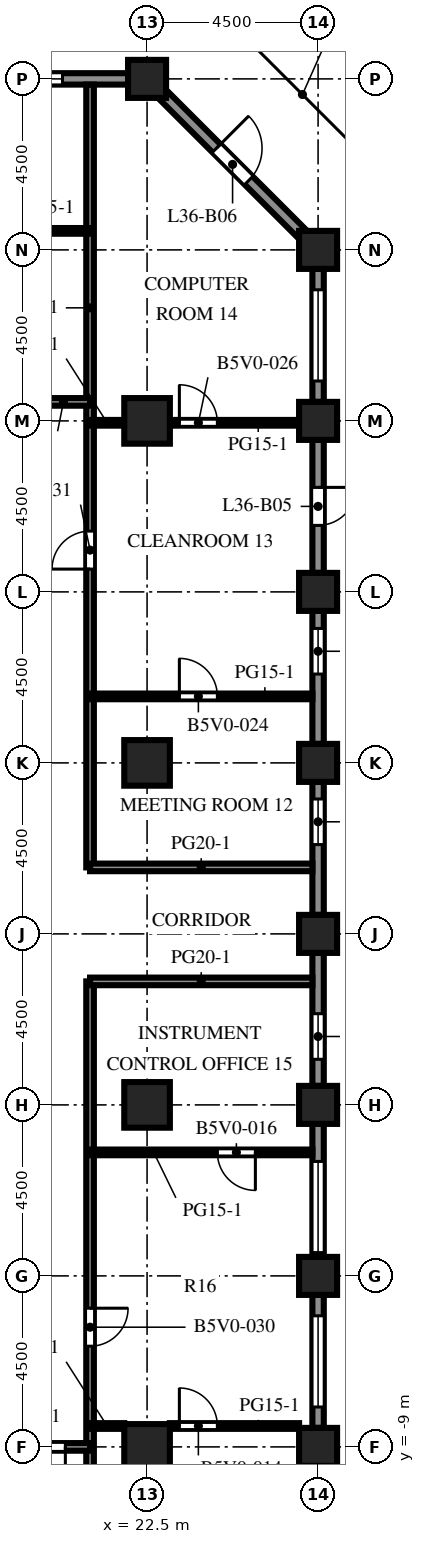
"""IFC4 building model, lengths in metres.
Left out: names, types, materials, properties, quantities, classifications, styles, units other than length and angle.
Written with IfcOpenShell. Run it as: python <this file> out.ifc"""

import sys

from ifc_helpers import new_model, si_unit, direction, frame, frame_2d, origin, origin_2d, place, context, subcontext, project, spatial, rectangle, extrude, element, fill, save


model = new_model("IFC4")
c1 = context("Model", 3, precision=1e-05, world=origin(), true_north=direction((0.0, 1.0)))
c2 = subcontext(c1, "Body", "Model", "MODEL_VIEW")
j1 = project(units=[si_unit("LENGTHUNIT", "METRE"), si_unit("PLANEANGLEUNIT", "RADIAN")], contexts=[c1])
p1 = place(None, origin())
s1 = spatial("IfcSite", under=j1, at=p1, CompositionType="ELEMENT")
p2 = place(p1, origin())
s2 = spatial("IfcBuilding", under=s1, at=p2, CompositionType="ELEMENT")
p3 = place(p2, frame((0.0, 0.0, 160.9)))
s3 = spatial("IfcBuildingStorey", under=s2, at=p3, CompositionType="ELEMENT", Elevation=160.9)
for number, where, z_axis, x_axis in (
    (1, (22.5, 27.0, 0.0), (0.0, 0.0, 1.0), (1.0, 0.0, 0.0)),
    (2, (27.0, -9.0, 0.0), (0.0, 0.0, 1.0), (1.0, 0.0, 0.0)),
    (3, (27.0, -4.5, 0.0), (0.0, 0.0, 1.0), (1.0, 0.0, 0.0)),
    (4, (27.0, 0.0, 0.0), (0.0, 0.0, 1.0), (1.0, 0.0, 0.0)),
    (5, (27.0, 4.5, 0.0), (0.0, 0.0, 1.0), (1.0, 0.0, 0.0)),
    (6, (27.0, 9.0, 0.0), (0.0, 0.0, 1.0), (1.0, 0.0, 0.0)),
    (7, (27.0, 13.5, 0.0), (0.0, 0.0, 1.0), (1.0, 0.0, 0.0)),
    (8, (27.0, 18.0, 0.0), (0.0, 0.0, 1.0), (1.0, 0.0, 0.0)),
    (9, (27.0, 22.5, 0.0), (0.0, 0.0, 1.0), (1.0, 0.0, 0.0)),
):
    element("IfcColumn", number, at=place(p3, frame(where, z_axis=z_axis, x_axis=x_axis)), inside=s3, PredefinedType="COLUMN", context=c2, shape_type="SweptSolid", body=[
        extrude(rectangle(XDim=1.0, YDim=1.0, at=origin_2d()), origin(), (0.0, 0.0, 1.0), 4.1),
    ])
for number, where, z_axis, x_axis in (
    (10, (22.5, -9.0, 0.0), (0.0, 0.0, 1.0), (1.0, 0.0, 0.0)),
    (11, (22.5, 0.0, 0.0), (0.0, 0.0, 1.0), (1.0, 0.0, 0.0)),
    (12, (22.5, 9.0, 0.0), (0.0, 0.0, 1.0), (1.0, 0.0, 0.0)),
    (13, (22.5, 18.0, 0.0), (0.0, 0.0, 1.0), (1.0, 0.0, 0.0)),
):
    element("IfcColumn", number, at=place(p3, frame(where, z_axis=z_axis, x_axis=x_axis)), inside=s3, PredefinedType="COLUMN", context=c2, shape_type="SweptSolid", body=[
        extrude(rectangle(XDim=1.2, YDim=1.2, at=origin_2d()), origin(), (0.0, 0.0, 1.0), 4.1),
    ])
p4 = place(p3, frame((27.0, -5.0, 0.0), z_axis=(0.0, 0.0, 1.0), x_axis=(0.0, -1.0, 0.0)))
e14 = element("IfcWall", 14, at=p4, inside=s3, PredefinedType="SOLIDWALL", context=c2, shape_type="SweptSolid", body=[
    extrude(rectangle(XDim=3.5, YDim=0.3, at=frame_2d((1.75, 0.0))), origin(), (0.0, 0.0, 1.0), 2.85),
])
p5 = place(p4, frame((0.55, 0.0, 0.8)))
e15 = element("IfcOpeningElement", 15, at=p5, cuts=e14, PredefinedType="OPENING", context=c2, shape_type="SweptSolid", body=[
    extrude(rectangle(XDim=2.4, YDim=1.7, at=frame_2d((1.2, 0.85))), frame((0.0, 0.16, 0.0), z_axis=(0.0, -1.0, 0.0), x_axis=(1.0, 0.0, 0.0)), (0.0, 0.0, 1.0), 0.32),
])
p6 = place(p3, frame((27.0, -0.5, 0.0), z_axis=(0.0, 0.0, 1.0), x_axis=(0.0, -1.0, 0.0)))
e16 = element("IfcWall", 16, at=p6, inside=s3, PredefinedType="SOLIDWALL", context=c2, shape_type="SweptSolid", body=[
    extrude(rectangle(XDim=3.5, YDim=0.3, at=frame_2d((1.75, 0.0))), origin(), (0.0, 0.0, 1.0), 2.85),
])
p7 = place(p6, frame((0.988, 0.0, 0.8)))
e17 = element("IfcOpeningElement", 17, at=p7, cuts=e16, PredefinedType="OPENING", context=c2, shape_type="SweptSolid", body=[
    extrude(rectangle(XDim=2.4, YDim=1.7, at=frame_2d((1.2, 0.85))), frame((0.0, 0.16, 0.0), z_axis=(0.0, -1.0, 0.0), x_axis=(1.0, 0.0, 0.0)), (0.0, 0.0, 1.0), 0.32),
])
p8 = place(p3, frame((27.0, 4.0, 0.0), z_axis=(0.0, 0.0, 1.0), x_axis=(0.0, -1.0, 0.0)))
e18 = element("IfcWall", 18, at=p8, inside=s3, PredefinedType="SOLIDWALL", context=c2, shape_type="SweptSolid", body=[
    extrude(rectangle(XDim=3.5, YDim=0.3, at=frame_2d((1.75, 0.0))), origin(), (0.0, 0.0, 1.0), 2.85),
])
p9 = place(p8, frame((1.6, 0.0, 0.8)))
e19 = element("IfcOpeningElement", 19, at=p9, cuts=e18, PredefinedType="OPENING", context=c2, shape_type="SweptSolid", body=[
    extrude(rectangle(XDim=1.2, YDim=1.7, at=frame_2d((0.6, 0.85))), frame((0.0, 0.16, 0.0), z_axis=(0.0, -1.0, 0.0), x_axis=(1.0, 0.0, 0.0)), (0.0, 0.0, 1.0), 0.32),
])
p10 = place(p3, frame((27.0, 8.5, 0.0), z_axis=(0.0, 0.0, 1.0), x_axis=(0.0, -1.0, 0.0)))
e20 = element("IfcWall", 20, at=p10, inside=s3, PredefinedType="SOLIDWALL", context=c2, shape_type="SweptSolid", body=[
    extrude(rectangle(XDim=3.5, YDim=0.3, at=frame_2d((1.75, 0.0))), origin(), (0.0, 0.0, 1.0), 2.85),
])
p11 = place(p10, frame((0.45, 0.0, 0.8)))
e21 = element("IfcOpeningElement", 21, at=p11, cuts=e20, PredefinedType="OPENING", context=c2, shape_type="SweptSolid", body=[
    extrude(rectangle(XDim=1.2, YDim=1.7, at=frame_2d((0.6, 0.85))), frame((0.0, 0.16, 0.0), z_axis=(0.0, -1.0, 0.0), x_axis=(1.0, 0.0, 0.0)), (0.0, 0.0, 1.0), 0.32),
])
p12 = place(p3, frame((27.0, 13.0, 0.0), z_axis=(0.0, 0.0, 1.0), x_axis=(0.0, -1.0, 0.0)))
e22 = element("IfcWall", 22, at=p12, inside=s3, PredefinedType="SOLIDWALL", context=c2, shape_type="SweptSolid", body=[
    extrude(rectangle(XDim=3.5, YDim=0.3, at=frame_2d((1.75, 0.0))), origin(), (0.0, 0.0, 1.0), 2.85),
])
p13 = place(p12, frame((0.462, 0.0, 0.8)))
e23 = element("IfcOpeningElement", 23, at=p13, cuts=e22, PredefinedType="OPENING", context=c2, shape_type="SweptSolid", body=[
    extrude(rectangle(XDim=1.2, YDim=1.7, at=frame_2d((0.6, 0.85))), frame((0.0, 0.16, 0.0), z_axis=(0.0, -1.0, 0.0), x_axis=(1.0, 0.0, 0.0)), (0.0, 0.0, 1.0), 0.32),
])
p14 = place(p3, frame((27.0, 17.5, 0.0), z_axis=(0.0, 0.0, 1.0), x_axis=(0.0, -1.0, 0.0)))
e24 = element("IfcWall", 24, at=p14, inside=s3, PredefinedType="SOLIDWALL", context=c2, shape_type="SweptSolid", body=[
    extrude(rectangle(XDim=3.5, YDim=0.3, at=frame_2d((1.75, 0.0))), origin(), (0.0, 0.0, 1.0), 2.85),
])
p15 = place(p14, frame((1.25, 0.0, 0.0)))
e25 = element("IfcOpeningElement", 25, at=p15, cuts=e24, PredefinedType="OPENING", context=c2, shape_type="SweptSolid", body=[
    extrude(rectangle(XDim=1.0, YDim=2.2, at=frame_2d((0.5, 1.1))), frame((0.0, 0.16, 0.0), z_axis=(0.0, -1.0, 0.0), x_axis=(1.0, 0.0, 0.0)), (0.0, 0.0, 1.0), 0.32),
])
p16 = place(p3, frame((27.0, 22.0, 0.0), z_axis=(0.0, 0.0, 1.0), x_axis=(0.0, -1.0, 0.0)))
e26 = element("IfcWall", 26, at=p16, inside=s3, PredefinedType="SOLIDWALL", context=c2, shape_type="SweptSolid", body=[
    extrude(rectangle(XDim=3.5, YDim=0.3, at=frame_2d((1.75, 0.0))), origin(), (0.0, 0.0, 1.0), 2.85),
])
p17 = place(p16, frame((0.55, 0.0, 0.8)))
e27 = element("IfcOpeningElement", 27, at=p17, cuts=e26, PredefinedType="OPENING", context=c2, shape_type="SweptSolid", body=[
    extrude(rectangle(XDim=2.4, YDim=1.7, at=frame_2d((1.2, 0.85))), frame((0.0, 0.16, 0.0), z_axis=(0.0, -1.0, 0.0), x_axis=(1.0, 0.0, 0.0)), (0.0, 0.0, 1.0), 0.32),
])
p18 = place(p3, frame((22.894, 26.606, 0.0), z_axis=(0.0, 0.0, 1.0), x_axis=(0.707106781187, -0.707106781187, 0.0)))
e28 = element("IfcWall", 28, at=p18, inside=s3, PredefinedType="SOLIDWALL", context=c2, shape_type="SweptSolid", body=[
    extrude(rectangle(XDim=5.25, YDim=0.3, at=frame_2d((2.625, 0.0))), origin(), (0.0, 0.0, 1.0), 2.85),
])
p19 = place(p18, frame((2.025, 0.0, 0.0)))
e29 = element("IfcOpeningElement", 29, at=p19, cuts=e28, PredefinedType="OPENING", context=c2, shape_type="SweptSolid", body=[
    extrude(rectangle(XDim=1.2, YDim=2.2, at=frame_2d((0.6, 1.1))), frame((0.0, 0.16, 0.0), z_axis=(0.0, -1.0, 0.0), x_axis=(1.0, 0.0, 0.0)), (0.0, 0.0, 1.0), 0.32),
])
p20 = place(p3, frame((18.5, 27.0, 0.0), z_axis=(0.0, 0.0, 1.0), x_axis=(1.0, 0.0, 0.0)))
e30 = element("IfcWall", 30, at=p20, inside=s3, PredefinedType="SOLIDWALL", context=c2, shape_type="SweptSolid", body=[
    extrude(rectangle(XDim=3.5, YDim=0.3, at=frame_2d((1.75, 0.0))), origin(), (0.0, 0.0, 1.0), 2.85),
])
p21 = place(p20, frame((0.575, 0.0, 0.8)))
e31 = element("IfcOpeningElement", 31, at=p21, cuts=e30, PredefinedType="OPENING", context=c2, shape_type="SweptSolid", body=[
    extrude(rectangle(XDim=1.2, YDim=1.7, at=frame_2d((0.6, 0.85))), frame((0.0, 0.16, 0.0), z_axis=(0.0, -1.0, 0.0), x_axis=(1.0, 0.0, 0.0)), (0.0, 0.0, 1.0), 0.32),
])
p22 = place(p3, frame((21.0, 3.25, 0.0), z_axis=(0.0, 0.0, 1.0), x_axis=(0.0, -1.0, 0.0)))
e32 = element("IfcWall", 32, at=p22, inside=s3, PredefinedType="PARTITIONING", context=c2, shape_type="SweptSolid", body=[
    extrude(rectangle(XDim=30.1, YDim=0.2, at=frame_2d((15.05, 0.0))), origin(), (0.0, 0.0, 1.0), 3.65),
])
p23 = place(p22, frame((8.6, 0.0, 0.0)))
e33 = element("IfcOpeningElement", 33, at=p23, cuts=e32, PredefinedType="OPENING", context=c2, shape_type="SweptSolid", body=[
    extrude(rectangle(XDim=1.0, YDim=2.1, at=frame_2d((0.5, 1.05))), frame((0.0, 0.11, 0.0), z_axis=(0.0, -1.0, 0.0), x_axis=(1.0, 0.0, 0.0)), (0.0, 0.0, 1.0), 0.22),
])
p24 = place(p3, frame((21.0, 26.85, 0.0), z_axis=(0.0, 0.0, 1.0), x_axis=(0.0, -1.0, 0.0)))
e34 = element("IfcWall", 34, at=p24, inside=s3, PredefinedType="PARTITIONING", context=c2, shape_type="SweptSolid", body=[
    extrude(rectangle(XDim=20.6, YDim=0.2, at=frame_2d((10.3, 0.0))), origin(), (0.0, 0.0, 1.0), 3.65),
])
p25 = place(p24, frame((11.75, 0.0, 0.0)))
e35 = element("IfcOpeningElement", 35, at=p25, cuts=e34, PredefinedType="OPENING", context=c2, shape_type="SweptSolid", body=[
    extrude(rectangle(XDim=1.0, YDim=2.1, at=frame_2d((0.5, 1.05))), frame((0.0, 0.11, 0.0), z_axis=(0.0, -1.0, 0.0), x_axis=(1.0, 0.0, 0.0)), (0.0, 0.0, 1.0), 0.22),
])
p26 = place(p3, frame((21.0, -9.0, 0.0), z_axis=(0.0, 0.0, 1.0), x_axis=(-1.0, 0.0, 0.0)))
e36 = element("IfcWall", 36, at=p26, inside=s3, PredefinedType="PARTITIONING", context=c2, shape_type="SweptSolid", body=[
    extrude(rectangle(XDim=3.0, YDim=0.2, at=frame_2d((1.5, 0.0))), origin(), (0.0, 0.0, 1.0), 3.65),
])
p27 = place(p26, frame((0.65, 0.0, 0.0)))
e37 = element("IfcOpeningElement", 37, at=p27, cuts=e36, PredefinedType="OPENING", context=c2, shape_type="SweptSolid", body=[
    extrude(rectangle(XDim=1.0, YDim=2.1, at=frame_2d((0.5, 1.05))), frame((0.0, 0.11, 0.0), z_axis=(0.0, -1.0, 0.0), x_axis=(1.0, 0.0, 0.0)), (0.0, 0.0, 1.0), 0.22),
])
p28 = place(p3, frame((21.0, -8.45, 0.0), z_axis=(0.0, 0.0, 1.0), x_axis=(1.0, 0.0, 0.0)))
e38 = element("IfcWall", 38, at=p28, inside=s3, PredefinedType="PARTITIONING", context=c2, shape_type="SweptSolid", body=[
    extrude(rectangle(XDim=0.9, YDim=0.15, at=frame_2d((0.45, 0.0))), origin(), (0.0, 0.0, 1.0), 3.65),
])
p29 = place(p3, frame((26.5, -8.45, 0.0), z_axis=(0.0, 0.0, 1.0), x_axis=(-1.0, 0.0, 0.0)))
e39 = element("IfcWall", 39, at=p29, inside=s3, PredefinedType="PARTITIONING", context=c2, shape_type="SweptSolid", body=[
    extrude(rectangle(XDim=3.4, YDim=0.15, at=frame_2d((1.7, 0.0))), origin(), (0.0, 0.0, 1.0), 3.65),
])
p30 = place(p29, frame((2.15, 0.0, 0.0)))
e40 = element("IfcOpeningElement", 40, at=p30, cuts=e39, PredefinedType="OPENING", context=c2, shape_type="SweptSolid", body=[
    extrude(rectangle(XDim=1.0, YDim=2.1, at=frame_2d((0.5, 1.05))), frame((0.0, 0.085, 0.0), z_axis=(0.0, -1.0, 0.0), x_axis=(1.0, 0.0, 0.0)), (0.0, 0.0, 1.0), 0.17),
])
p31 = place(p3, frame((21.0, -1.25, 0.0), z_axis=(0.0, 0.0, 1.0), x_axis=(1.0, 0.0, 0.0)))
e41 = element("IfcWall", 41, at=p31, inside=s3, PredefinedType="PARTITIONING", context=c2, shape_type="SweptSolid", body=[
    extrude(rectangle(XDim=5.85, YDim=0.15, at=frame_2d((2.925, 0.0))), origin(), (0.0, 0.0, 1.0), 3.65),
])
p32 = place(p31, frame((3.35, 0.0, 0.0)))
e42 = element("IfcOpeningElement", 42, at=p32, cuts=e41, PredefinedType="OPENING", context=c2, shape_type="SweptSolid", body=[
    extrude(rectangle(XDim=1.0, YDim=2.1, at=frame_2d((0.5, 1.05))), frame((0.0, 0.085, 0.0), z_axis=(0.0, -1.0, 0.0), x_axis=(1.0, 0.0, 0.0)), (0.0, 0.0, 1.0), 0.17),
])
for number, where, z_axis, x_axis in (
    (43, (21.0, 3.25, 0.0), (0.0, 0.0, 1.0), (1.0, 0.0, 0.0)),
    (44, (21.0, 6.25, 0.0), (0.0, 0.0, 1.0), (1.0, 0.0, 0.0)),
):
    element("IfcWall", number, at=place(p3, frame(where, z_axis=z_axis, x_axis=x_axis)), inside=s3, PredefinedType="PARTITIONING", context=c2, shape_type="SweptSolid", body=[
        extrude(rectangle(XDim=5.85, YDim=0.2, at=frame_2d((2.925, 0.0))), origin(), (0.0, 0.0, 1.0), 3.65),
    ])
p33 = place(p3, frame((26.85, 10.75, 0.0), z_axis=(0.0, 0.0, 1.0), x_axis=(-1.0, 0.0, 0.0)))
e45 = element("IfcWall", 45, at=p33, inside=s3, PredefinedType="PARTITIONING", context=c2, shape_type="SweptSolid", body=[
    extrude(rectangle(XDim=5.85, YDim=0.15, at=frame_2d((2.925, 0.0))), origin(), (0.0, 0.0, 1.0), 3.65),
])
p34 = place(p33, frame((2.5, 0.0, 0.0)))
e46 = element("IfcOpeningElement", 46, at=p34, cuts=e45, PredefinedType="OPENING", context=c2, shape_type="SweptSolid", body=[
    extrude(rectangle(XDim=1.0, YDim=2.1, at=frame_2d((0.5, 1.05))), frame((0.0, 0.085, 0.0), z_axis=(0.0, -1.0, 0.0), x_axis=(1.0, 0.0, 0.0)), (0.0, 0.0, 1.0), 0.17),
])
p35 = place(p3, frame((21.0, 17.95, 0.0), z_axis=(0.0, 0.0, 1.0), x_axis=(1.0, 0.0, 0.0)))
e47 = element("IfcWall", 47, at=p35, inside=s3, PredefinedType="PARTITIONING", context=c2, shape_type="SweptSolid", body=[
    extrude(rectangle(XDim=0.9, YDim=0.15, at=frame_2d((0.45, 0.0))), origin(), (0.0, 0.0, 1.0), 3.65),
])
p36 = place(p3, frame((23.1, 17.95, 0.0), z_axis=(0.0, 0.0, 1.0), x_axis=(1.0, 0.0, 0.0)))
e48 = element("IfcWall", 48, at=p36, inside=s3, PredefinedType="PARTITIONING", context=c2, shape_type="SweptSolid", body=[
    extrude(rectangle(XDim=3.4, YDim=0.15, at=frame_2d((1.7, 0.0))), origin(), (0.0, 0.0, 1.0), 3.65),
])
p37 = place(p36, frame((0.25, 0.0, 0.0)))
e49 = element("IfcOpeningElement", 49, at=p37, cuts=e48, PredefinedType="OPENING", context=c2, shape_type="SweptSolid", body=[
    extrude(rectangle(XDim=1.0, YDim=2.1, at=frame_2d((0.5, 1.05))), frame((0.0, 0.085, 0.0), z_axis=(0.0, -1.0, 0.0), x_axis=(1.0, 0.0, 0.0)), (0.0, 0.0, 1.0), 0.17),
])
p38 = place(p3, frame((18.0, 18.5, 0.0), z_axis=(0.0, 0.0, 1.0), x_axis=(1.0, 0.0, 0.0)))
e50 = element("IfcWall", 50, at=p38, inside=s3, PredefinedType="PARTITIONING", context=c2, shape_type="SweptSolid", body=[
    extrude(rectangle(XDim=3.0, YDim=0.2, at=frame_2d((1.5, 0.0))), origin(), (0.0, 0.0, 1.0), 3.65),
])
p39 = place(p38, frame((0.6, 0.0, 0.0)))
e51 = element("IfcOpeningElement", 51, at=p39, cuts=e50, PredefinedType="OPENING", context=c2, shape_type="SweptSolid", body=[
    extrude(rectangle(XDim=1.0, YDim=2.1, at=frame_2d((0.5, 1.05))), frame((0.0, 0.11, 0.0), z_axis=(0.0, -1.0, 0.0), x_axis=(1.0, 0.0, 0.0)), (0.0, 0.0, 1.0), 0.22),
])
p40 = place(p3, frame((18.6, 23.0, 0.0), z_axis=(0.0, 0.0, 1.0), x_axis=(1.0, 0.0, 0.0)))
e52 = element("IfcWall", 52, at=p40, inside=s3, PredefinedType="PARTITIONING", context=c2, shape_type="SweptSolid", body=[
    extrude(rectangle(XDim=2.4, YDim=0.15, at=frame_2d((1.2, 0.0))), origin(), (0.0, 0.0, 1.0), 3.65),
])
p41 = place(p5, origin())
e53 = element("IfcWindow", 53, at=p41, inside=s3, PartitioningType="SINGLE_PANEL", PredefinedType="WINDOW", context=c2, shape_type="SweptSolid", body=[
    extrude(rectangle(XDim=2.4, YDim=1.7, at=frame_2d((1.2, 0.85))), frame((0.0, 0.03, 0.0), z_axis=(0.0, -1.0, 0.0), x_axis=(1.0, 0.0, 0.0)), (0.0, 0.0, 1.0), 0.06),
])
fill(e15, e53)
p42 = place(p7, origin())
e54 = element("IfcWindow", 54, at=p42, inside=s3, PartitioningType="SINGLE_PANEL", PredefinedType="WINDOW", context=c2, shape_type="SweptSolid", body=[
    extrude(rectangle(XDim=2.4, YDim=1.7, at=frame_2d((1.2, 0.85))), frame((0.0, 0.03, 0.0), z_axis=(0.0, -1.0, 0.0), x_axis=(1.0, 0.0, 0.0)), (0.0, 0.0, 1.0), 0.06),
])
fill(e17, e54)
p43 = place(p9, origin())
e55 = element("IfcWindow", 55, at=p43, inside=s3, PartitioningType="SINGLE_PANEL", PredefinedType="WINDOW", context=c2, shape_type="SweptSolid", body=[
    extrude(rectangle(XDim=1.2, YDim=1.7, at=frame_2d((0.6, 0.85))), frame((0.0, 0.03, 0.0), z_axis=(0.0, -1.0, 0.0), x_axis=(1.0, 0.0, 0.0)), (0.0, 0.0, 1.0), 0.06),
])
fill(e19, e55)
p44 = place(p11, origin())
e56 = element("IfcWindow", 56, at=p44, inside=s3, PartitioningType="SINGLE_PANEL", PredefinedType="WINDOW", context=c2, shape_type="SweptSolid", body=[
    extrude(rectangle(XDim=1.2, YDim=1.7, at=frame_2d((0.6, 0.85))), frame((0.0, 0.03, 0.0), z_axis=(0.0, -1.0, 0.0), x_axis=(1.0, 0.0, 0.0)), (0.0, 0.0, 1.0), 0.06),
])
fill(e21, e56)
p45 = place(p13, origin())
e57 = element("IfcWindow", 57, at=p45, inside=s3, PartitioningType="SINGLE_PANEL", PredefinedType="WINDOW", context=c2, shape_type="SweptSolid", body=[
    extrude(rectangle(XDim=1.2, YDim=1.7, at=frame_2d((0.6, 0.85))), frame((0.0, 0.03, 0.0), z_axis=(0.0, -1.0, 0.0), x_axis=(1.0, 0.0, 0.0)), (0.0, 0.0, 1.0), 0.06),
])
fill(e23, e57)
p46 = place(p15, origin())
e58 = element("IfcDoor", 58, at=p46, inside=s3, OperationType="SINGLE_SWING_LEFT", PredefinedType="DOOR", context=c2, shape_type="SweptSolid", body=[
    extrude(rectangle(XDim=1.0, YDim=2.2, at=frame_2d((0.5, 1.1))), frame((0.0, 0.025, 0.0), z_axis=(0.0, -1.0, 0.0), x_axis=(1.0, 0.0, 0.0)), (0.0, 0.0, 1.0), 0.05),
])
fill(e25, e58)
p47 = place(p17, origin())
e59 = element("IfcWindow", 59, at=p47, inside=s3, PartitioningType="SINGLE_PANEL", PredefinedType="WINDOW", context=c2, shape_type="SweptSolid", body=[
    extrude(rectangle(XDim=2.4, YDim=1.7, at=frame_2d((1.2, 0.85))), frame((0.0, 0.03, 0.0), z_axis=(0.0, -1.0, 0.0), x_axis=(1.0, 0.0, 0.0)), (0.0, 0.0, 1.0), 0.06),
])
fill(e27, e59)
p48 = place(p19, origin())
e60 = element("IfcDoor", 60, at=p48, inside=s3, OperationType="SINGLE_SWING_LEFT", PredefinedType="DOOR", context=c2, shape_type="SweptSolid", body=[
    extrude(rectangle(XDim=1.2, YDim=2.2, at=frame_2d((0.6, 1.1))), frame((0.0, 0.025, 0.0), z_axis=(0.0, -1.0, 0.0), x_axis=(1.0, 0.0, 0.0)), (0.0, 0.0, 1.0), 0.05),
])
fill(e29, e60)
p49 = place(p21, origin())
e61 = element("IfcWindow", 61, at=p49, inside=s3, PartitioningType="SINGLE_PANEL", PredefinedType="WINDOW", context=c2, shape_type="SweptSolid", body=[
    extrude(rectangle(XDim=1.2, YDim=1.7, at=frame_2d((0.6, 0.85))), frame((0.0, 0.03, 0.0), z_axis=(0.0, -1.0, 0.0), x_axis=(1.0, 0.0, 0.0)), (0.0, 0.0, 1.0), 0.06),
])
fill(e31, e61)
p50 = place(p27, origin())
e62 = element("IfcDoor", 62, at=p50, inside=s3, OperationType="SINGLE_SWING_LEFT", PredefinedType="DOOR", context=c2, shape_type="SweptSolid", body=[
    extrude(rectangle(XDim=1.0, YDim=2.1, at=frame_2d((0.5, 1.05))), frame((0.0, 0.025, 0.0), z_axis=(0.0, -1.0, 0.0), x_axis=(1.0, 0.0, 0.0)), (0.0, 0.0, 1.0), 0.05),
])
fill(e37, e62)
p51 = place(p30, origin())
e63 = element("IfcDoor", 63, at=p51, inside=s3, OperationType="SINGLE_SWING_RIGHT", PredefinedType="DOOR", context=c2, shape_type="SweptSolid", body=[
    extrude(rectangle(XDim=1.0, YDim=2.1, at=frame_2d((0.5, 1.05))), frame((0.0, 0.025, 0.0), z_axis=(0.0, -1.0, 0.0), x_axis=(1.0, 0.0, 0.0)), (0.0, 0.0, 1.0), 0.05),
])
fill(e40, e63)
p52 = place(p32, origin())
e64 = element("IfcDoor", 64, at=p52, inside=s3, OperationType="SINGLE_SWING_RIGHT", PredefinedType="DOOR", context=c2, shape_type="SweptSolid", body=[
    extrude(rectangle(XDim=1.0, YDim=2.1, at=frame_2d((0.5, 1.05))), frame((0.0, 0.025, 0.0), z_axis=(0.0, -1.0, 0.0), x_axis=(1.0, 0.0, 0.0)), (0.0, 0.0, 1.0), 0.05),
])
fill(e42, e64)
p53 = place(p34, origin())
e65 = element("IfcDoor", 65, at=p53, inside=s3, OperationType="SINGLE_SWING_RIGHT", PredefinedType="DOOR", context=c2, shape_type="SweptSolid", body=[
    extrude(rectangle(XDim=1.0, YDim=2.1, at=frame_2d((0.5, 1.05))), frame((0.0, 0.025, 0.0), z_axis=(0.0, -1.0, 0.0), x_axis=(1.0, 0.0, 0.0)), (0.0, 0.0, 1.0), 0.05),
])
fill(e46, e65)
p54 = place(p37, origin())
e66 = element("IfcDoor", 66, at=p54, inside=s3, OperationType="SINGLE_SWING_LEFT", PredefinedType="DOOR", context=c2, shape_type="SweptSolid", body=[
    extrude(rectangle(XDim=1.0, YDim=2.1, at=frame_2d((0.5, 1.05))), frame((0.0, 0.025, 0.0), z_axis=(0.0, -1.0, 0.0), x_axis=(1.0, 0.0, 0.0)), (0.0, 0.0, 1.0), 0.05),
])
fill(e49, e66)
p55 = place(p23, origin())
e67 = element("IfcDoor", 67, at=p55, inside=s3, OperationType="SINGLE_SWING_LEFT", PredefinedType="DOOR", context=c2, shape_type="SweptSolid", body=[
    extrude(rectangle(XDim=1.0, YDim=2.1, at=frame_2d((0.5, 1.05))), frame((0.0, 0.025, 0.0), z_axis=(0.0, -1.0, 0.0), x_axis=(1.0, 0.0, 0.0)), (0.0, 0.0, 1.0), 0.05),
])
fill(e33, e67)
p56 = place(p25, origin())
e68 = element("IfcDoor", 68, at=p56, inside=s3, OperationType="SINGLE_SWING_RIGHT", PredefinedType="DOOR", context=c2, shape_type="SweptSolid", body=[
    extrude(rectangle(XDim=1.0, YDim=2.1, at=frame_2d((0.5, 1.05))), frame((0.0, 0.025, 0.0), z_axis=(0.0, -1.0, 0.0), x_axis=(1.0, 0.0, 0.0)), (0.0, 0.0, 1.0), 0.05),
])
fill(e35, e68)
save(model, sys.argv[1])
